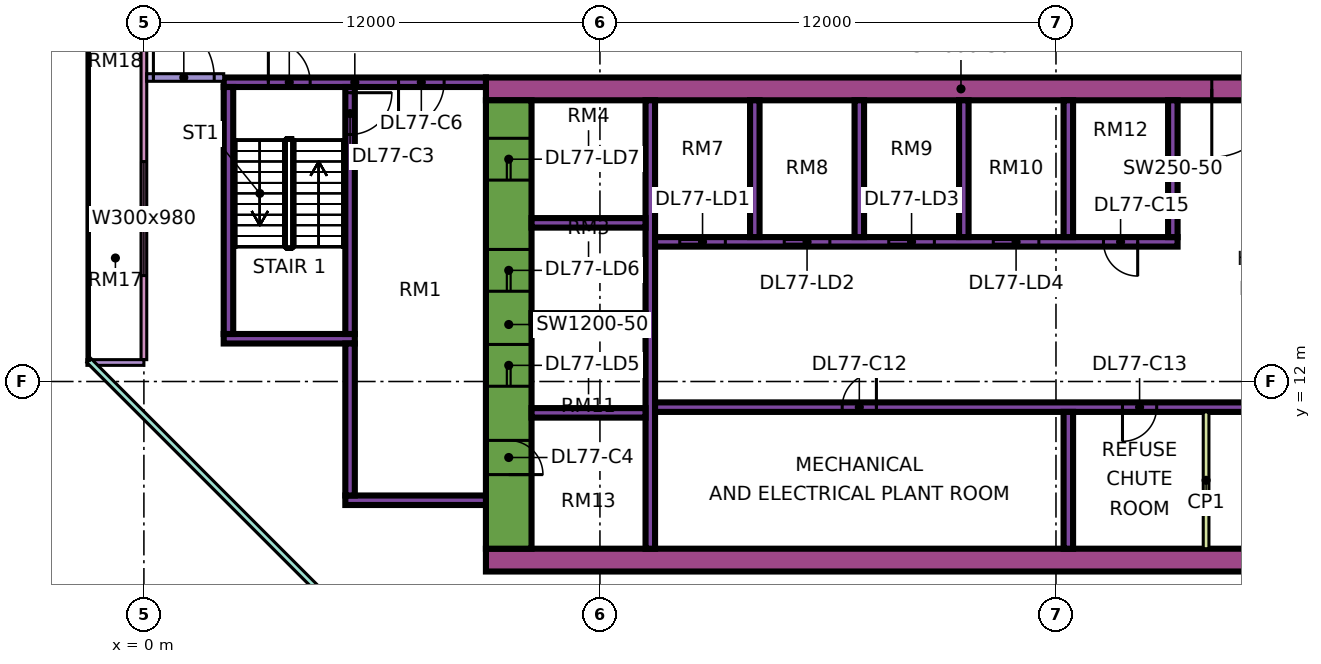
"""IFC4 building model, lengths in metres.
Left out: names, types, materials, properties, quantities, classifications, styles, units other than length and angle.
Written with IfcOpenShell. Run it as: python <this file> out.ifc"""

import sys

from ifc_helpers import new_model, si_unit, direction, frame, frame_2d, origin, place, context, subcontext, project, spatial, rectangle, extrude, element, fill, save


model = new_model("IFC4")
c1 = context("Model", 3, precision=1e-05, world=origin(), true_north=direction((0.0, 1.0)))
c2 = subcontext(c1, "Body", "Model", "MODEL_VIEW")
j1 = project(units=[si_unit("LENGTHUNIT", "METRE"), si_unit("PLANEANGLEUNIT", "RADIAN")], contexts=[c1])
p1 = place(None, origin())
s1 = spatial("IfcSite", under=j1, at=p1, CompositionType="ELEMENT")
p2 = place(p1, origin())
s2 = spatial("IfcBuilding", under=s1, at=p2, CompositionType="ELEMENT")
p3 = place(p2, frame((0.0, 0.0, 327.65)))
s3 = spatial("IfcBuildingStorey", under=s2, at=p3, CompositionType="ELEMENT", Elevation=327.65)
p4 = place(p3, frame((9.0, 7.3, 0.0), z_axis=(0.0, 0.0, 1.0), x_axis=(1.0, 0.0, 0.0)))
e1 = element("IfcWall", 1, at=p4, inside=s3, PredefinedType="SHEAR", context=c2, shape_type="SweptSolid", body=[
    extrude(rectangle(XDim=25.0, YDim=0.6, at=frame_2d((12.5, 0.0))), origin(), (0.0, 0.0, 1.0), 11.25),
])
p5 = place(p3, frame((9.0, 19.7, 0.0), z_axis=(0.0, 0.0, 1.0), x_axis=(1.0, 0.0, 0.0)))
e2 = element("IfcWall", 2, at=p5, inside=s3, PredefinedType="SHEAR", context=c2, shape_type="SweptSolid", body=[
    extrude(rectangle(XDim=25.0, YDim=0.6, at=frame_2d((12.5, 0.0))), origin(), (0.0, 0.0, 1.0), 11.25),
])
p6 = place(p5, frame((19.1, 0.0, 0.0)))
e3 = element("IfcOpeningElement", 3, at=p6, cuts=e2, PredefinedType="OPENING", context=c2, shape_type="SweptSolid", body=[
    extrude(rectangle(XDim=1.8, YDim=2.4, at=frame_2d((0.9, 1.2))), frame((0.0, 0.31, 0.0), z_axis=(0.0, -1.0, 0.0), x_axis=(1.0, 0.0, 0.0)), (0.0, 0.0, 1.0), 0.62),
])
p7 = place(p3, frame((9.6, 7.6, 0.0), z_axis=(0.0, 0.0, 1.0), x_axis=(0.0, 1.0, 0.0)))
e4 = element("IfcWall", 4, at=p7, inside=s3, PredefinedType="SHEAR", context=c2, shape_type="SweptSolid", body=[
    extrude(rectangle(XDim=11.8, YDim=1.2, at=frame_2d((5.9, 0.0))), origin(), (0.0, 0.0, 1.0), 11.25),
])
p8 = place(p7, frame((4.275, 0.0, 0.0)))
e5 = element("IfcOpeningElement", 5, at=p8, cuts=e4, PredefinedType="OPENING", context=c2, shape_type="SweptSolid", body=[
    extrude(rectangle(XDim=1.1, YDim=2.2, at=frame_2d((0.55, 1.1))), frame((0.0, 0.61, 0.0), z_axis=(0.0, -1.0, 0.0), x_axis=(1.0, 0.0, 0.0)), (0.0, 0.0, 1.0), 1.22),
])
p9 = place(p7, frame((6.775, 0.0, 0.0)))
e6 = element("IfcOpeningElement", 6, at=p9, cuts=e4, PredefinedType="OPENING", context=c2, shape_type="SweptSolid", body=[
    extrude(rectangle(XDim=1.1, YDim=2.2, at=frame_2d((0.55, 1.1))), frame((0.0, 0.61, 0.0), z_axis=(0.0, -1.0, 0.0), x_axis=(1.0, 0.0, 0.0)), (0.0, 0.0, 1.0), 1.22),
])
p10 = place(p7, frame((9.7, 0.0, 0.0)))
e7 = element("IfcOpeningElement", 7, at=p10, cuts=e4, PredefinedType="OPENING", context=c2, shape_type="SweptSolid", body=[
    extrude(rectangle(XDim=1.1, YDim=2.2, at=frame_2d((0.55, 1.1))), frame((0.0, 0.61, 0.0), z_axis=(0.0, -1.0, 0.0), x_axis=(1.0, 0.0, 0.0)), (0.0, 0.0, 1.0), 1.22),
])
p11 = place(p7, frame((1.95, 0.0, 0.0)))
e8 = element("IfcOpeningElement", 8, at=p11, cuts=e4, PredefinedType="OPENING", context=c2, shape_type="SweptSolid", body=[
    extrude(rectangle(XDim=0.9, YDim=2.1, at=frame_2d((0.45, 1.05))), frame((0.0, 0.61, 0.0), z_axis=(0.0, -1.0, 0.0), x_axis=(1.0, 0.0, 0.0)), (0.0, 0.0, 1.0), 1.22),
])
p12 = place(p3, frame((13.325, 7.6, 0.0), z_axis=(0.0, 0.0, 1.0), x_axis=(0.0, 1.0, 0.0)))
e9 = element("IfcWall", 9, at=p12, inside=s3, PredefinedType="SHEAR", context=c2, shape_type="SweptSolid", body=[
    extrude(rectangle(XDim=11.8, YDim=0.25, at=frame_2d((5.9, 0.0))), origin(), (0.0, 0.0, 1.0), 11.25),
])
p13 = place(p3, frame((13.45, 11.325, 0.0), z_axis=(0.0, 0.0, 1.0), x_axis=(1.0, 0.0, 0.0)))
e10 = element("IfcWall", 10, at=p13, inside=s3, PredefinedType="SHEAR", context=c2, shape_type="SweptSolid", body=[
    extrude(rectangle(XDim=19.95, YDim=0.25, at=frame_2d((9.975, 0.0))), origin(), (0.0, 0.0, 1.0), 11.25),
])
p14 = place(p13, frame((4.925, 0.0, 0.0)))
e11 = element("IfcOpeningElement", 11, at=p14, cuts=e10, PredefinedType="OPENING", context=c2, shape_type="SweptSolid", body=[
    extrude(rectangle(XDim=0.9, YDim=2.1, at=frame_2d((0.45, 1.05))), frame((0.0, 0.135, 0.0), z_axis=(0.0, -1.0, 0.0), x_axis=(1.0, 0.0, 0.0)), (0.0, 0.0, 1.0), 0.27),
])
p15 = place(p13, frame((12.3, 0.0, 0.0)))
e12 = element("IfcOpeningElement", 12, at=p15, cuts=e10, PredefinedType="OPENING", context=c2, shape_type="SweptSolid", body=[
    extrude(rectangle(XDim=0.9, YDim=2.1, at=frame_2d((0.45, 1.05))), frame((0.0, 0.135, 0.0), z_axis=(0.0, -1.0, 0.0), x_axis=(1.0, 0.0, 0.0)), (0.0, 0.0, 1.0), 0.27),
])
p16 = place(p13, frame((16.775, 0.0, 0.0)))
e13 = element("IfcOpeningElement", 13, at=p16, cuts=e10, PredefinedType="OPENING", context=c2, shape_type="SweptSolid", body=[
    extrude(rectangle(XDim=0.9, YDim=2.1, at=frame_2d((0.45, 1.05))), frame((0.0, 0.135, 0.0), z_axis=(0.0, -1.0, 0.0), x_axis=(1.0, 0.0, 0.0)), (0.0, 0.0, 1.0), 0.27),
])
p17 = place(p3, frame((13.45, 15.675, 0.0), z_axis=(0.0, 0.0, 1.0), x_axis=(1.0, 0.0, 0.0)))
e14 = element("IfcWall", 14, at=p17, inside=s3, PredefinedType="SHEAR", context=c2, shape_type="SweptSolid", body=[
    extrude(rectangle(XDim=13.75, YDim=0.25, at=frame_2d((6.875, 0.0))), origin(), (0.0, 0.0, 1.0), 11.25),
])
p18 = place(p17, frame((0.65, 0.0, 0.0)))
e15 = element("IfcOpeningElement", 15, at=p18, cuts=e14, PredefinedType="OPENING", context=c2, shape_type="SweptSolid", body=[
    extrude(rectangle(XDim=1.2, YDim=2.2, at=frame_2d((0.6, 1.1))), frame((0.0, 0.135, 0.0), z_axis=(0.0, -1.0, 0.0), x_axis=(1.0, 0.0, 0.0)), (0.0, 0.0, 1.0), 0.27),
])
p19 = place(p17, frame((3.4, 0.0, 0.0)))
e16 = element("IfcOpeningElement", 16, at=p19, cuts=e14, PredefinedType="OPENING", context=c2, shape_type="SweptSolid", body=[
    extrude(rectangle(XDim=1.2, YDim=2.2, at=frame_2d((0.6, 1.1))), frame((0.0, 0.135, 0.0), z_axis=(0.0, -1.0, 0.0), x_axis=(1.0, 0.0, 0.0)), (0.0, 0.0, 1.0), 0.27),
])
p20 = place(p17, frame((6.15, 0.0, 0.0)))
e17 = element("IfcOpeningElement", 17, at=p20, cuts=e14, PredefinedType="OPENING", context=c2, shape_type="SweptSolid", body=[
    extrude(rectangle(XDim=1.2, YDim=2.2, at=frame_2d((0.6, 1.1))), frame((0.0, 0.135, 0.0), z_axis=(0.0, -1.0, 0.0), x_axis=(1.0, 0.0, 0.0)), (0.0, 0.0, 1.0), 0.27),
])
p21 = place(p17, frame((8.9, 0.0, 0.0)))
e18 = element("IfcOpeningElement", 18, at=p21, cuts=e14, PredefinedType="OPENING", context=c2, shape_type="SweptSolid", body=[
    extrude(rectangle(XDim=1.2, YDim=2.2, at=frame_2d((0.6, 1.1))), frame((0.0, 0.135, 0.0), z_axis=(0.0, -1.0, 0.0), x_axis=(1.0, 0.0, 0.0)), (0.0, 0.0, 1.0), 0.27),
])
p22 = place(p17, frame((11.8, 0.0, 0.0)))
e19 = element("IfcOpeningElement", 19, at=p22, cuts=e14, PredefinedType="OPENING", context=c2, shape_type="SweptSolid", body=[
    extrude(rectangle(XDim=0.9, YDim=2.1, at=frame_2d((0.45, 1.05))), frame((0.0, 0.135, 0.0), z_axis=(0.0, -1.0, 0.0), x_axis=(1.0, 0.0, 0.0)), (0.0, 0.0, 1.0), 0.27),
])
for number, where, z_axis, x_axis in (
    (20, (10.2, 11.175, 0.0), (0.0, 0.0, 1.0), (1.0, 0.0, 0.0)),
    (21, (10.2, 13.675, 0.0), (0.0, 0.0, 1.0), (1.0, 0.0, 0.0)),
    (22, (10.2, 16.175, 0.0), (0.0, 0.0, 1.0), (1.0, 0.0, 0.0)),
):
    element("IfcWall", number, at=place(p3, frame(where, z_axis=z_axis, x_axis=x_axis)), inside=s3, PredefinedType="SHEAR", context=c2, shape_type="SweptSolid", body=[
        extrude(rectangle(XDim=3.0, YDim=0.25, at=frame_2d((1.5, 0.0))), origin(), (0.0, 0.0, 1.0), 11.25),
    ])
for number, where, z_axis, x_axis in (
    (23, (24.325, 7.6, 0.0), (0.0, 0.0, 1.0), (0.0, 1.0, 0.0)),
    (24, (16.075, 15.8, 0.0), (0.0, 0.0, 1.0), (0.0, 1.0, 0.0)),
    (25, (18.825, 15.8, 0.0), (0.0, 0.0, 1.0), (0.0, 1.0, 0.0)),
    (26, (21.575, 15.8, 0.0), (0.0, 0.0, 1.0), (0.0, 1.0, 0.0)),
    (27, (24.325, 15.8, 0.0), (0.0, 0.0, 1.0), (0.0, 1.0, 0.0)),
    (28, (27.075, 15.8, 0.0), (0.0, 0.0, 1.0), (0.0, 1.0, 0.0)),
):
    element("IfcWall", number, at=place(p3, frame(where, z_axis=z_axis, x_axis=x_axis)), inside=s3, PredefinedType="SHEAR", context=c2, shape_type="SweptSolid", body=[
        extrude(rectangle(XDim=3.6, YDim=0.25, at=frame_2d((1.8, 0.0))), origin(), (0.0, 0.0, 1.0), 11.25),
    ])
p23 = place(p3, frame((2.1, 19.875, 0.0), z_axis=(0.0, 0.0, 1.0), x_axis=(1.0, 0.0, 0.0)))
e29 = element("IfcWall", 29, at=p23, inside=s3, PredefinedType="SHEAR", context=c2, shape_type="SweptSolid", body=[
    extrude(rectangle(XDim=6.9, YDim=0.25, at=frame_2d((3.45, 0.0))), origin(), (0.0, 0.0, 1.0), 11.25),
])
p24 = place(p23, frame((1.175, 0.0, 0.0)))
e30 = element("IfcOpeningElement", 30, at=p24, cuts=e29, PredefinedType="OPENING", context=c2, shape_type="SweptSolid", body=[
    extrude(rectangle(XDim=1.1, YDim=2.2, at=frame_2d((0.55, 1.1))), frame((0.0, 0.135, 0.0), z_axis=(0.0, -1.0, 0.0), x_axis=(1.0, 0.0, 0.0)), (0.0, 0.0, 1.0), 0.27),
])
p25 = place(p23, frame((4.6, 0.0, 0.0)))
e31 = element("IfcOpeningElement", 31, at=p25, cuts=e29, PredefinedType="OPENING", context=c2, shape_type="SweptSolid", body=[
    extrude(rectangle(XDim=1.2, YDim=2.2, at=frame_2d((0.6, 1.1))), frame((0.0, 0.135, 0.0), z_axis=(0.0, -1.0, 0.0), x_axis=(1.0, 0.0, 0.0)), (0.0, 0.0, 1.0), 0.27),
])
p26 = place(p3, frame((2.1, 13.125, 0.0), z_axis=(0.0, 0.0, 1.0), x_axis=(1.0, 0.0, 0.0)))
e32 = element("IfcWall", 32, at=p26, inside=s3, PredefinedType="SHEAR", context=c2, shape_type="SweptSolid", body=[
    extrude(rectangle(XDim=3.45, YDim=0.25, at=frame_2d((1.725, 0.0))), origin(), (0.0, 0.0, 1.0), 11.25),
])
p27 = place(p3, frame((2.225, 13.25, 0.0), z_axis=(0.0, 0.0, 1.0), x_axis=(0.0, 1.0, 0.0)))
e33 = element("IfcWall", 33, at=p27, inside=s3, PredefinedType="SHEAR", context=c2, shape_type="SweptSolid", body=[
    extrude(rectangle(XDim=6.5, YDim=0.25, at=frame_2d((3.25, 0.0))), origin(), (0.0, 0.0, 1.0), 11.25),
])
p28 = place(p3, frame((5.425, 13.25, 0.0), z_axis=(0.0, 0.0, 1.0), x_axis=(0.0, 1.0, 0.0)))
e34 = element("IfcWall", 34, at=p28, inside=s3, PredefinedType="SHEAR", context=c2, shape_type="SweptSolid", body=[
    extrude(rectangle(XDim=6.5, YDim=0.25, at=frame_2d((3.25, 0.0))), origin(), (0.0, 0.0, 1.0), 11.25),
])
p29 = place(p28, frame((5.25, 0.0, 0.0)))
e35 = element("IfcOpeningElement", 35, at=p29, cuts=e34, PredefinedType="OPENING", context=c2, shape_type="SweptSolid", body=[
    extrude(rectangle(XDim=1.1, YDim=2.2, at=frame_2d((0.55, 1.1))), frame((0.0, 0.135, 0.0), z_axis=(0.0, -1.0, 0.0), x_axis=(1.0, 0.0, 0.0)), (0.0, 0.0, 1.0), 0.27),
])
p30 = place(p3, frame((5.3, 8.875, 0.0), z_axis=(0.0, 0.0, 1.0), x_axis=(1.0, 0.0, 0.0)))
e36 = element("IfcWall", 36, at=p30, inside=s3, PredefinedType="SHEAR", context=c2, shape_type="SweptSolid", body=[
    extrude(rectangle(XDim=3.7, YDim=0.25, at=frame_2d((1.85, 0.0))), origin(), (0.0, 0.0, 1.0), 11.25),
])
p31 = place(p3, frame((5.425, 9.0, 0.0), z_axis=(0.0, 0.0, 1.0), x_axis=(0.0, 1.0, 0.0)))
e37 = element("IfcWall", 37, at=p31, inside=s3, PredefinedType="SHEAR", context=c2, shape_type="SweptSolid", body=[
    extrude(rectangle(XDim=4.0, YDim=0.25, at=frame_2d((2.0, 0.0))), origin(), (0.0, 0.0, 1.0), 11.25),
])
p32 = place(p3, frame((0.0, 23.925, 0.0), z_axis=(0.0, 0.0, 1.0), x_axis=(0.0, -1.0, 0.0)))
e38 = element("IfcWall", 38, at=p32, inside=s3, PredefinedType="SOLIDWALL", context=c2, shape_type="SweptSolid", body=[
    extrude(rectangle(XDim=11.35, YDim=0.15, at=frame_2d((5.675, 0.0))), origin(), (0.0, 0.0, 1.0), 10.85),
])
p33 = place(p32, frame((6.137, 0.0, 0.45)))
e39 = element("IfcOpeningElement", 39, at=p33, cuts=e38, PredefinedType="OPENING", context=c2, shape_type="SweptSolid", body=[
    extrude(rectangle(XDim=3.0, YDim=9.8, at=frame_2d((1.5, 4.9))), frame((0.0, 0.085, 0.0), z_axis=(0.0, -1.0, 0.0), x_axis=(1.0, 0.0, 0.0)), (0.0, 0.0, 1.0), 0.17),
])
p34 = place(p3, frame((-1.5, 12.5, 0.0), z_axis=(0.0, 0.0, 1.0), x_axis=(1.0, 0.0, 0.0)))
e40 = element("IfcWall", 40, at=p34, inside=s3, PredefinedType="SOLIDWALL", context=c2, shape_type="SweptSolid", body=[
    extrude(rectangle(XDim=1.5, YDim=0.15, at=frame_2d((0.75, 0.0))), origin(), (0.0, 0.0, 1.0), 10.85),
])
p35 = place(p3, frame((-1.447, 12.553, 0.0), z_axis=(0.0, 0.0, 1.0), x_axis=(0.707106781187, -0.707106781187, 0.0)))
e41 = element("IfcWall", 41, at=p35, inside=s3, PredefinedType="SOLIDWALL", context=c2, shape_type="SweptSolid", body=[
    extrude(rectangle(XDim=19.799, YDim=0.15, at=frame_2d((9.899, 0.0))), origin(), (0.0, 0.0, 1.0), 10.85),
])
p36 = place(p35, frame((8.399, 0.0, 0.45)))
e42 = element("IfcOpeningElement", 42, at=p36, cuts=e41, PredefinedType="OPENING", context=c2, shape_type="SweptSolid", body=[
    extrude(rectangle(XDim=3.0, YDim=9.8, at=frame_2d((1.5, 4.9))), frame((0.0, 0.085, 0.0), z_axis=(0.0, -1.0, 0.0), x_axis=(1.0, 0.0, 0.0)), (0.0, 0.0, 1.0), 0.17),
])
p37 = place(p3, frame((27.95, 7.6, 0.0), z_axis=(0.0, 0.0, 1.0), x_axis=(0.0, 1.0, 0.0)))
e43 = element("IfcWall", 43, at=p37, inside=s3, PredefinedType="PARTITIONING", context=c2, shape_type="SweptSolid", body=[
    extrude(rectangle(XDim=3.6, YDim=0.15, at=frame_2d((1.8, 0.0))), origin(), (0.0, 0.0, 1.0), 10.85),
])
p38 = place(p3, frame((0.074, 20.0, 0.0), z_axis=(0.0, 0.0, 1.0), x_axis=(1.0, 0.0, 0.0)))
e44 = element("IfcWall", 44, at=p38, inside=s3, PredefinedType="PARTITIONING", context=c2, shape_type="SweptSolid", body=[
    extrude(rectangle(XDim=2.026, YDim=0.2, at=frame_2d((1.013, 0.0))), origin(), (0.0, 0.0, 1.0), 10.85),
])
p39 = place(p38, frame((0.176, 0.0, 0.0)))
e45 = element("IfcOpeningElement", 45, at=p39, cuts=e44, PredefinedType="OPENING", context=c2, shape_type="SweptSolid", body=[
    extrude(rectangle(XDim=1.6, YDim=2.1, at=frame_2d((0.8, 1.05))), frame((0.0, 0.11, 0.0), z_axis=(0.0, -1.0, 0.0), x_axis=(1.0, 0.0, 0.0)), (0.0, 0.0, 1.0), 0.22),
])
p40 = place(p33, origin())
e46 = element("IfcWindow", 46, at=p40, inside=s3, PartitioningType="SINGLE_PANEL", PredefinedType="WINDOW", context=c2, shape_type="SweptSolid", body=[
    extrude(rectangle(XDim=3.0, YDim=9.8, at=frame_2d((1.5, 4.9))), frame((0.0, 0.03, 0.0), z_axis=(0.0, -1.0, 0.0), x_axis=(1.0, 0.0, 0.0)), (0.0, 0.0, 1.0), 0.06),
])
fill(e39, e46)
p41 = place(p18, origin())
e47 = element("IfcDoor", 47, at=p41, inside=s3, OperationType="DOUBLE_DOOR_SLIDING", PredefinedType="DOOR", context=c2, shape_type="SweptSolid", body=[
    extrude(rectangle(XDim=1.2, YDim=2.2, at=frame_2d((0.6, 1.1))), frame((0.0, 0.025, 0.0), z_axis=(0.0, -1.0, 0.0), x_axis=(1.0, 0.0, 0.0)), (0.0, 0.0, 1.0), 0.05),
])
fill(e15, e47)
p42 = place(p19, origin())
e48 = element("IfcDoor", 48, at=p42, inside=s3, OperationType="DOUBLE_DOOR_SLIDING", PredefinedType="DOOR", context=c2, shape_type="SweptSolid", body=[
    extrude(rectangle(XDim=1.2, YDim=2.2, at=frame_2d((0.6, 1.1))), frame((0.0, 0.025, 0.0), z_axis=(0.0, -1.0, 0.0), x_axis=(1.0, 0.0, 0.0)), (0.0, 0.0, 1.0), 0.05),
])
fill(e16, e48)
p43 = place(p20, origin())
e49 = element("IfcDoor", 49, at=p43, inside=s3, OperationType="DOUBLE_DOOR_SLIDING", PredefinedType="DOOR", context=c2, shape_type="SweptSolid", body=[
    extrude(rectangle(XDim=1.2, YDim=2.2, at=frame_2d((0.6, 1.1))), frame((0.0, 0.025, 0.0), z_axis=(0.0, -1.0, 0.0), x_axis=(1.0, 0.0, 0.0)), (0.0, 0.0, 1.0), 0.05),
])
fill(e17, e49)
p44 = place(p21, origin())
e50 = element("IfcDoor", 50, at=p44, inside=s3, OperationType="DOUBLE_DOOR_SLIDING", PredefinedType="DOOR", context=c2, shape_type="SweptSolid", body=[
    extrude(rectangle(XDim=1.2, YDim=2.2, at=frame_2d((0.6, 1.1))), frame((0.0, 0.025, 0.0), z_axis=(0.0, -1.0, 0.0), x_axis=(1.0, 0.0, 0.0)), (0.0, 0.0, 1.0), 0.05),
])
fill(e18, e50)
p45 = place(p8, origin())
e51 = element("IfcDoor", 51, at=p45, inside=s3, OperationType="DOUBLE_DOOR_SLIDING", PredefinedType="DOOR", context=c2, shape_type="SweptSolid", body=[
    extrude(rectangle(XDim=1.1, YDim=2.2, at=frame_2d((0.55, 1.1))), frame((0.0, 0.025, 0.0), z_axis=(0.0, -1.0, 0.0), x_axis=(1.0, 0.0, 0.0)), (0.0, 0.0, 1.0), 0.05),
])
fill(e5, e51)
p46 = place(p9, origin())
e52 = element("IfcDoor", 52, at=p46, inside=s3, OperationType="DOUBLE_DOOR_SLIDING", PredefinedType="DOOR", context=c2, shape_type="SweptSolid", body=[
    extrude(rectangle(XDim=1.1, YDim=2.2, at=frame_2d((0.55, 1.1))), frame((0.0, 0.025, 0.0), z_axis=(0.0, -1.0, 0.0), x_axis=(1.0, 0.0, 0.0)), (0.0, 0.0, 1.0), 0.05),
])
fill(e6, e52)
p47 = place(p10, origin())
e53 = element("IfcDoor", 53, at=p47, inside=s3, OperationType="DOUBLE_DOOR_SLIDING", PredefinedType="DOOR", context=c2, shape_type="SweptSolid", body=[
    extrude(rectangle(XDim=1.1, YDim=2.2, at=frame_2d((0.55, 1.1))), frame((0.0, 0.025, 0.0), z_axis=(0.0, -1.0, 0.0), x_axis=(1.0, 0.0, 0.0)), (0.0, 0.0, 1.0), 0.05),
])
fill(e7, e53)
p48 = place(p6, frame((1.8, 0.0, 0.0), z_axis=(0.0, 0.0, 1.0), x_axis=(-1.0, 0.0, 0.0)))
e54 = element("IfcDoor", 54, at=p48, inside=s3, OperationType="DOUBLE_DOOR_SINGLE_SWING", PredefinedType="DOOR", context=c2, shape_type="SweptSolid", body=[
    extrude(rectangle(XDim=1.8, YDim=2.4, at=frame_2d((0.9, 1.2))), frame((0.0, 0.025, 0.0), z_axis=(0.0, -1.0, 0.0), x_axis=(1.0, 0.0, 0.0)), (0.0, 0.0, 1.0), 0.05),
])
fill(e3, e54)
p49 = place(p29, origin())
e55 = element("IfcDoor", 55, at=p49, inside=s3, OperationType="SINGLE_SWING_RIGHT", PredefinedType="DOOR", context=c2, shape_type="SweptSolid", body=[
    extrude(rectangle(XDim=1.1, YDim=2.2, at=frame_2d((0.55, 1.1))), frame((0.0, 0.025, 0.0), z_axis=(0.0, -1.0, 0.0), x_axis=(1.0, 0.0, 0.0)), (0.0, 0.0, 1.0), 0.05),
])
fill(e35, e55)
p50 = place(p11, frame((0.9, 0.0, 0.0), z_axis=(0.0, 0.0, 1.0), x_axis=(-1.0, 0.0, 0.0)))
e56 = element("IfcDoor", 56, at=p50, inside=s3, OperationType="SINGLE_SWING_LEFT", PredefinedType="DOOR", context=c2, shape_type="SweptSolid", body=[
    extrude(rectangle(XDim=0.9, YDim=2.1, at=frame_2d((0.45, 1.05))), frame((0.0, 0.025, 0.0), z_axis=(0.0, -1.0, 0.0), x_axis=(1.0, 0.0, 0.0)), (0.0, 0.0, 1.0), 0.05),
])
fill(e8, e56)
p51 = place(p24, origin())
e57 = element("IfcDoor", 57, at=p51, inside=s3, OperationType="SINGLE_SWING_LEFT", PredefinedType="DOOR", context=c2, shape_type="SweptSolid", body=[
    extrude(rectangle(XDim=1.1, YDim=2.2, at=frame_2d((0.55, 1.1))), frame((0.0, 0.025, 0.0), z_axis=(0.0, -1.0, 0.0), x_axis=(1.0, 0.0, 0.0)), (0.0, 0.0, 1.0), 0.05),
])
fill(e30, e57)
p52 = place(p25, frame((1.2, 0.0, 0.0), z_axis=(0.0, 0.0, 1.0), x_axis=(-1.0, 0.0, 0.0)))
e58 = element("IfcDoor", 58, at=p52, inside=s3, OperationType="SINGLE_SWING_LEFT", PredefinedType="DOOR", context=c2, shape_type="SweptSolid", body=[
    extrude(rectangle(XDim=1.2, YDim=2.2, at=frame_2d((0.6, 1.1))), frame((0.0, 0.025, 0.0), z_axis=(0.0, -1.0, 0.0), x_axis=(1.0, 0.0, 0.0)), (0.0, 0.0, 1.0), 0.05),
])
fill(e31, e58)
p53 = place(p14, frame((0.9, 0.0, 0.0), z_axis=(0.0, 0.0, 1.0), x_axis=(-1.0, 0.0, 0.0)))
e59 = element("IfcDoor", 59, at=p53, inside=s3, OperationType="SINGLE_SWING_RIGHT", PredefinedType="DOOR", context=c2, shape_type="SweptSolid", body=[
    extrude(rectangle(XDim=0.9, YDim=2.1, at=frame_2d((0.45, 1.05))), frame((0.0, 0.025, 0.0), z_axis=(0.0, -1.0, 0.0), x_axis=(1.0, 0.0, 0.0)), (0.0, 0.0, 1.0), 0.05),
])
fill(e11, e59)
p54 = place(p15, frame((0.9, 0.0, 0.0), z_axis=(0.0, 0.0, 1.0), x_axis=(-1.0, 0.0, 0.0)))
e60 = element("IfcDoor", 60, at=p54, inside=s3, OperationType="SINGLE_SWING_LEFT", PredefinedType="DOOR", context=c2, shape_type="SweptSolid", body=[
    extrude(rectangle(XDim=0.9, YDim=2.1, at=frame_2d((0.45, 1.05))), frame((0.0, 0.025, 0.0), z_axis=(0.0, -1.0, 0.0), x_axis=(1.0, 0.0, 0.0)), (0.0, 0.0, 1.0), 0.05),
])
fill(e12, e60)
p55 = place(p22, origin())
e61 = element("IfcDoor", 61, at=p55, inside=s3, OperationType="SINGLE_SWING_RIGHT", PredefinedType="DOOR", context=c2, shape_type="SweptSolid", body=[
    extrude(rectangle(XDim=0.9, YDim=2.1, at=frame_2d((0.45, 1.05))), frame((0.0, 0.025, 0.0), z_axis=(0.0, -1.0, 0.0), x_axis=(1.0, 0.0, 0.0)), (0.0, 0.0, 1.0), 0.05),
])
fill(e19, e61)
p56 = place(p39, origin())
e62 = element("IfcDoor", 62, at=p56, inside=s3, OperationType="DOUBLE_DOOR_SINGLE_SWING", PredefinedType="DOOR", context=c2, shape_type="SweptSolid", body=[
    extrude(rectangle(XDim=1.6, YDim=2.1, at=frame_2d((0.8, 1.05))), frame((0.0, 0.025, 0.0), z_axis=(0.0, -1.0, 0.0), x_axis=(1.0, 0.0, 0.0)), (0.0, 0.0, 1.0), 0.05),
])
fill(e45, e62)
save(model, sys.argv[1])
